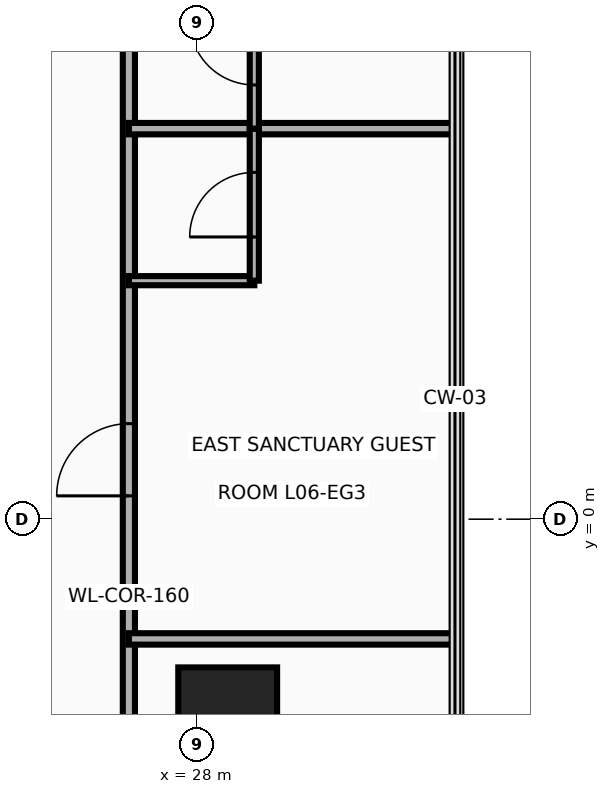
"""IFC4 building model, lengths in metres.
Left out: names, types, materials, properties, quantities, classifications, styles, units other than length and angle.
Written with IfcOpenShell. Run it as: python <this file> out.ifc"""

import sys

from ifc_helpers import new_model, si_unit, direction, frame, frame_2d, origin, origin_2d, place, context, subcontext, project, spatial, rectangle, circle, extrude, source, transform, mapped, element, fill, save


model = new_model("IFC4")
c1 = context("Model", 3, precision=1e-05, world=origin(), true_north=direction((0.0, 1.0)))
c2 = subcontext(c1, "Body", "Model", "MODEL_VIEW")
j1 = project(units=[si_unit("LENGTHUNIT", "METRE"), si_unit("PLANEANGLEUNIT", "RADIAN")], contexts=[c1])
p1 = place(None, origin())
s1 = spatial("IfcSite", under=j1, at=p1, CompositionType="ELEMENT")
p2 = place(p1, origin())
s2 = spatial("IfcBuilding", under=s1, at=p2, CompositionType="ELEMENT")
p3 = place(p2, frame((0.0, 0.0, 29.7)))
s3 = spatial("IfcBuildingStorey", under=s2, at=p3, CompositionType="ELEMENT", Elevation=29.7)
m1 = source(origin(), c2, "Body", "SweptSolid", [
    extrude(circle(Radius=0.65, at=origin_2d()), origin(), (0.0, 0.0, 1.0), 3.7),
])
p4 = place(p3, frame((28.4, -2.6, 0.0), z_axis=(0.0, 0.0, 1.0), x_axis=(1.0, 0.0, 0.0)))
e1 = element("IfcColumn", 1, at=p4, inside=s3, PredefinedType="COLUMN", context=c2, shape_type="MappedRepresentation", body=[
    mapped(m1, transform((0.0, 0.0, 0.0), x_axis=(1.0, 0.0, 0.0), y_axis=(0.0, 1.0, 0.0), z_axis=(0.0, 0.0, 1.0), scale=1.0)),
])
p5 = place(p3, frame((27.1, -13.89, 0.0), z_axis=(0.0, 0.0, 1.0), x_axis=(0.0, 1.0, 0.0)))
e2 = element("IfcWall", 2, at=p5, inside=s3, PredefinedType="PARTITIONING", context=c2, shape_type="SweptSolid", body=[
    extrude(rectangle(XDim=25.74, YDim=0.16, at=frame_2d((12.87, 0.0))), origin(), (0.0, 0.0, 1.0), 2.583),
])
p6 = place(p5, frame((2.62, 0.0, 0.0)))
e3 = element("IfcOpeningElement", 3, at=p6, cuts=e2, PredefinedType="OPENING", context=c2, shape_type="SweptSolid", body=[
    extrude(rectangle(XDim=0.95, YDim=2.15, at=frame_2d((0.475, 1.075))), frame((0.0, 0.095, 0.0), z_axis=(0.0, -1.0, 0.0), x_axis=(1.0, 0.0, 0.0)), (0.0, 0.0, 1.0), 0.19),
])
p7 = place(p5, frame((8.484, 0.0, 0.0)))
e4 = element("IfcOpeningElement", 4, at=p7, cuts=e2, PredefinedType="OPENING", context=c2, shape_type="SweptSolid", body=[
    extrude(rectangle(XDim=0.95, YDim=2.15, at=frame_2d((0.475, 1.075))), frame((0.0, 0.095, 0.0), z_axis=(0.0, -1.0, 0.0), x_axis=(1.0, 0.0, 0.0)), (0.0, 0.0, 1.0), 0.19),
])
p8 = place(p5, frame((14.197, 0.0, 0.0)))
e5 = element("IfcOpeningElement", 5, at=p8, cuts=e2, PredefinedType="OPENING", context=c2, shape_type="SweptSolid", body=[
    extrude(rectangle(XDim=0.95, YDim=2.15, at=frame_2d((0.475, 1.075))), frame((0.0, 0.095, 0.0), z_axis=(0.0, -1.0, 0.0), x_axis=(1.0, 0.0, 0.0)), (0.0, 0.0, 1.0), 0.19),
])
p9 = place(p5, frame((21.648, 0.0, 0.0)))
e6 = element("IfcOpeningElement", 6, at=p9, cuts=e2, PredefinedType="OPENING", context=c2, shape_type="SweptSolid", body=[
    extrude(rectangle(XDim=0.95, YDim=2.15, at=frame_2d((0.475, 1.075))), frame((0.0, 0.095, 0.0), z_axis=(0.0, -1.0, 0.0), x_axis=(1.0, 0.0, 0.0)), (0.0, 0.0, 1.0), 0.19),
])
for number, where, z_axis, x_axis in (
    (7, (27.1, -1.575, 0.0), (0.0, 0.0, 1.0), (1.0, 0.0, 0.0)),
    (8, (27.1, 5.138, 0.0), (0.0, 0.0, 1.0), (1.0, 0.0, 0.0)),
):
    element("IfcWall", number, at=place(p3, frame(where, z_axis=z_axis, x_axis=x_axis)), inside=s3, PredefinedType="PARTITIONING", context=c2, shape_type="SweptSolid", body=[
        extrude(rectangle(XDim=4.29, YDim=0.15, at=frame_2d((2.145, 0.0))), origin(), (0.0, 0.0, 1.0), 2.896),
    ])
p10 = place(p3, frame((27.1, 3.138, 0.0), z_axis=(0.0, 0.0, 1.0), x_axis=(1.0, 0.0, 0.0)))
e9 = element("IfcWall", 9, at=p10, inside=s3, PredefinedType="PARTITIONING", context=c2, shape_type="SweptSolid", body=[
    extrude(rectangle(XDim=1.65, YDim=0.12, at=frame_2d((0.825, 0.0))), origin(), (0.0, 0.0, 1.0), 2.896),
])
p11 = place(p3, frame((28.75, 3.138, 0.0), z_axis=(0.0, 0.0, 1.0), x_axis=(0.0, 1.0, 0.0)))
e10 = element("IfcWall", 10, at=p11, inside=s3, PredefinedType="PARTITIONING", context=c2, shape_type="SweptSolid", body=[
    extrude(rectangle(XDim=2.0, YDim=0.12, at=frame_2d((1.0, 0.0))), origin(), (0.0, 0.0, 1.0), 3.46),
])
p12 = place(p11, frame((0.575, 0.0, 0.0)))
e11 = element("IfcOpeningElement", 11, at=p12, cuts=e10, PredefinedType="OPENING", context=c2, shape_type="SweptSolid", body=[
    extrude(rectangle(XDim=0.85, YDim=2.1, at=frame_2d((0.425, 1.05))), frame((0.0, 0.075, 0.0), z_axis=(0.0, -1.0, 0.0), x_axis=(1.0, 0.0, 0.0)), (0.0, 0.0, 1.0), 0.15),
])
p13 = place(p3, frame((28.75, 5.138, 0.0), z_axis=(0.0, 0.0, 1.0), x_axis=(0.0, 1.0, 0.0)))
e12 = element("IfcWall", 12, at=p13, inside=s3, PredefinedType="PARTITIONING", context=c2, shape_type="SweptSolid", body=[
    extrude(rectangle(XDim=2.0, YDim=0.12, at=frame_2d((1.0, 0.0))), origin(), (0.0, 0.0, 1.0), 3.46),
])
p14 = place(p13, frame((0.575, 0.0, 0.0)))
e13 = element("IfcOpeningElement", 13, at=p14, cuts=e12, PredefinedType="OPENING", context=c2, shape_type="SweptSolid", body=[
    extrude(rectangle(XDim=0.85, YDim=2.1, at=frame_2d((0.425, 1.05))), frame((0.0, 0.075, 0.0), z_axis=(0.0, -1.0, 0.0), x_axis=(1.0, 0.0, 0.0)), (0.0, 0.0, 1.0), 0.15),
])
p15 = place(p8, origin())
e14 = element("IfcDoor", 14, at=p15, inside=s3, OperationType="SINGLE_SWING_RIGHT", PredefinedType="DOOR", context=c2, shape_type="SweptSolid", body=[
    extrude(rectangle(XDim=0.95, YDim=2.15, at=frame_2d((0.475, 1.075))), frame((0.0, 0.025, 0.0), z_axis=(0.0, -1.0, 0.0), x_axis=(1.0, 0.0, 0.0)), (0.0, 0.0, 1.0), 0.05),
])
fill(e5, e14)
p16 = place(p12, origin())
e15 = element("IfcDoor", 15, at=p16, inside=s3, OperationType="SINGLE_SWING_LEFT", PredefinedType="DOOR", context=c2, shape_type="SweptSolid", body=[
    extrude(rectangle(XDim=0.85, YDim=2.1, at=frame_2d((0.425, 1.05))), frame((0.0, 0.025, 0.0), z_axis=(0.0, -1.0, 0.0), x_axis=(1.0, 0.0, 0.0)), (0.0, 0.0, 1.0), 0.05),
])
fill(e11, e15)
p17 = place(p14, origin())
e16 = element("IfcDoor", 16, at=p17, inside=s3, OperationType="SINGLE_SWING_LEFT", PredefinedType="DOOR", context=c2, shape_type="SweptSolid", body=[
    extrude(rectangle(XDim=0.85, YDim=2.1, at=frame_2d((0.425, 1.05))), frame((0.0, 0.025, 0.0), z_axis=(0.0, -1.0, 0.0), x_axis=(1.0, 0.0, 0.0)), (0.0, 0.0, 1.0), 0.05),
])
fill(e13, e16)
save(model, sys.argv[1])
